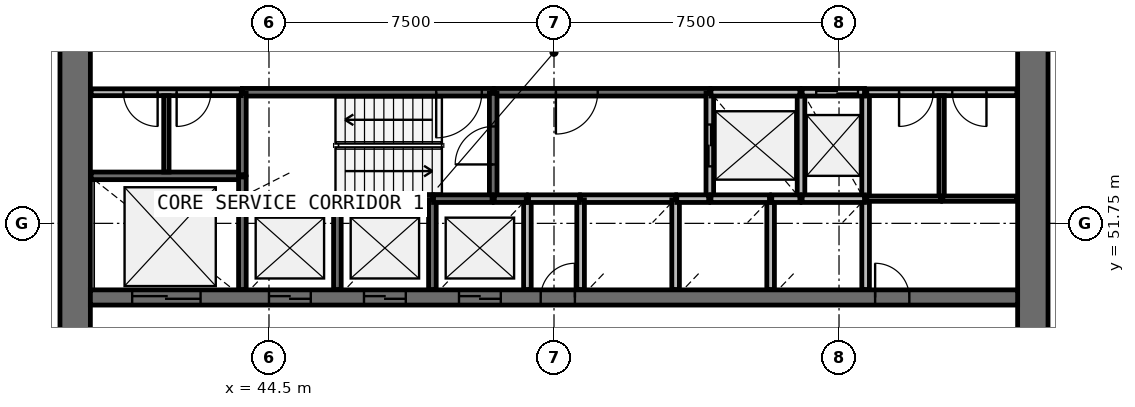
"""IFC4 building model, lengths in metres.
Left out: names, types, materials, properties, quantities, classifications, styles, units other than length and angle.
Written with IfcOpenShell. Run it as: python <this file> out.ifc"""

import sys

from ifc_helpers import new_model, si_unit, direction, frame, frame_2d, origin, place, context, subcontext, project, spatial, rectangle, extrude, source, transform, mapped, element, fill, save


model = new_model("IFC4")
c1 = context("Model", 3, precision=1e-05, world=origin(), true_north=direction((0.0, 1.0)))
c2 = subcontext(c1, "Body", "Model", "MODEL_VIEW")
j1 = project(units=[si_unit("LENGTHUNIT", "METRE"), si_unit("PLANEANGLEUNIT", "RADIAN")], contexts=[c1])
p1 = place(None, origin())
s1 = spatial("IfcSite", under=j1, at=p1, CompositionType="ELEMENT")
p2 = place(p1, origin())
s2 = spatial("IfcBuilding", under=s1, at=p2, CompositionType="ELEMENT")
p3 = place(p2, frame((0.0, 0.0, 124.9)))
s3 = spatial("IfcBuildingStorey", under=s2, at=p3, CompositionType="ELEMENT", Elevation=124.9)
p4 = place(p3, frame((64.6, 38.0, 0.0), z_axis=(0.0, 0.0, 1.0), x_axis=(0.0, 1.0, 0.0)))
e1 = element("IfcWall", 1, at=p4, inside=s3, PredefinedType="SHEAR", context=c2, shape_type="SweptSolid", body=[
    extrude(rectangle(XDim=20.0, YDim=0.8, at=frame_2d((10.0, 0.0))), origin(), (0.0, 0.0, 1.0), 4.1),
])
p5 = place(p4, frame((9.1, 0.0, 0.0)))
e2 = element("IfcOpeningElement", 2, at=p5, cuts=e1, PredefinedType="OPENING", context=c2, shape_type="SweptSolid", body=[
    extrude(rectangle(XDim=1.8, YDim=2.1, at=frame_2d((0.9, 1.05))), frame((0.0, 0.41, 0.0), z_axis=(0.0, -1.0, 0.0), x_axis=(1.0, 0.0, 0.0)), (0.0, 0.0, 1.0), 0.82),
])
p6 = place(p3, frame((39.4, 58.0, 0.0), z_axis=(0.0, 0.0, 1.0), x_axis=(0.0, -1.0, 0.0)))
e3 = element("IfcWall", 3, at=p6, inside=s3, PredefinedType="SHEAR", context=c2, shape_type="SweptSolid", body=[
    extrude(rectangle(XDim=20.0, YDim=0.8, at=frame_2d((10.0, 0.0))), origin(), (0.0, 0.0, 1.0), 4.1),
])
p7 = place(p6, frame((9.1, 0.0, 0.0)))
e4 = element("IfcOpeningElement", 4, at=p7, cuts=e3, PredefinedType="OPENING", context=c2, shape_type="SweptSolid", body=[
    extrude(rectangle(XDim=1.8, YDim=2.1, at=frame_2d((0.9, 1.05))), frame((0.0, 0.41, 0.0), z_axis=(0.0, -1.0, 0.0), x_axis=(1.0, 0.0, 0.0)), (0.0, 0.0, 1.0), 0.82),
])
p8 = place(p3, frame((39.8, 49.8, 0.0), z_axis=(0.0, 0.0, 1.0), x_axis=(1.0, 0.0, 0.0)))
e5 = element("IfcWall", 5, at=p8, inside=s3, PredefinedType="SHEAR", context=c2, shape_type="SweptSolid", body=[
    extrude(rectangle(XDim=24.4, YDim=0.4, at=frame_2d((12.2, 0.0))), origin(), (0.0, 0.0, 1.0), 4.1),
])
p9 = place(p8, frame((4.7, 0.0, 0.0)))
e6 = element("IfcOpeningElement", 6, at=p9, cuts=e5, PredefinedType="OPENING", context=c2, shape_type="SweptSolid", body=[
    extrude(rectangle(XDim=1.1, YDim=2.1, at=frame_2d((0.55, 1.05))), frame((0.0, 0.21, 0.0), z_axis=(0.0, -1.0, 0.0), x_axis=(1.0, 0.0, 0.0)), (0.0, 0.0, 1.0), 0.42),
])
p10 = place(p8, frame((7.2, 0.0, 0.0)))
e7 = element("IfcOpeningElement", 7, at=p10, cuts=e5, PredefinedType="OPENING", context=c2, shape_type="SweptSolid", body=[
    extrude(rectangle(XDim=1.1, YDim=2.1, at=frame_2d((0.55, 1.05))), frame((0.0, 0.21, 0.0), z_axis=(0.0, -1.0, 0.0), x_axis=(1.0, 0.0, 0.0)), (0.0, 0.0, 1.0), 0.42),
])
p11 = place(p8, frame((9.7, 0.0, 0.0)))
e8 = element("IfcOpeningElement", 8, at=p11, cuts=e5, PredefinedType="OPENING", context=c2, shape_type="SweptSolid", body=[
    extrude(rectangle(XDim=1.1, YDim=2.1, at=frame_2d((0.55, 1.05))), frame((0.0, 0.21, 0.0), z_axis=(0.0, -1.0, 0.0), x_axis=(1.0, 0.0, 0.0)), (0.0, 0.0, 1.0), 0.42),
])
p12 = place(p8, frame((1.1, 0.0, 0.0)))
e9 = element("IfcOpeningElement", 9, at=p12, cuts=e5, PredefinedType="OPENING", context=c2, shape_type="SweptSolid", body=[
    extrude(rectangle(XDim=1.8, YDim=2.4, at=frame_2d((0.9, 1.2))), frame((0.0, 0.21, 0.0), z_axis=(0.0, -1.0, 0.0), x_axis=(1.0, 0.0, 0.0)), (0.0, 0.0, 1.0), 0.42),
])
p13 = place(p8, frame((20.65, 0.0, 0.0)))
e10 = element("IfcOpeningElement", 10, at=p13, cuts=e5, PredefinedType="OPENING", context=c2, shape_type="SweptSolid", body=[
    extrude(rectangle(XDim=0.9, YDim=2.1, at=frame_2d((0.45, 1.05))), frame((0.0, 0.21, 0.0), z_axis=(0.0, -1.0, 0.0), x_axis=(1.0, 0.0, 0.0)), (0.0, 0.0, 1.0), 0.42),
])
p14 = place(p8, frame((11.85, 0.0, 0.0)))
e11 = element("IfcOpeningElement", 11, at=p14, cuts=e5, PredefinedType="OPENING", context=c2, shape_type="SweptSolid", body=[
    extrude(rectangle(XDim=0.9, YDim=2.1, at=frame_2d((0.45, 1.05))), frame((0.0, 0.21, 0.0), z_axis=(0.0, -1.0, 0.0), x_axis=(1.0, 0.0, 0.0)), (0.0, 0.0, 1.0), 0.42),
])
p15 = place(p3, frame((50.4, 55.2, 0.0), z_axis=(0.0, 0.0, 1.0), x_axis=(-1.0, 0.0, 0.0)))
e12 = element("IfcWall", 12, at=p15, inside=s3, PredefinedType="SOLIDWALL", context=c2, shape_type="SweptSolid", body=[
    extrude(rectangle(XDim=6.6, YDim=0.2, at=frame_2d((3.3, 0.0))), origin(), (0.0, 0.0, 1.0), 3.6),
])
p16 = place(p15, frame((0.3, 0.0, 0.0)))
e13 = element("IfcOpeningElement", 13, at=p16, cuts=e12, PredefinedType="OPENING", context=c2, shape_type="SweptSolid", body=[
    extrude(rectangle(XDim=1.2, YDim=2.1, at=frame_2d((0.6, 1.05))), frame((0.0, 0.11, 0.0), z_axis=(0.0, -1.0, 0.0), x_axis=(1.0, 0.0, 0.0)), (0.0, 0.0, 1.0), 0.22),
])
p17 = place(p3, frame((56.1, 55.2, 0.0), z_axis=(0.0, 0.0, 1.0), x_axis=(-1.0, 0.0, 0.0)))
e14 = element("IfcWall", 14, at=p17, inside=s3, PredefinedType="SOLIDWALL", context=c2, shape_type="SweptSolid", body=[
    extrude(rectangle(XDim=5.67, YDim=0.2, at=frame_2d((2.835, 0.0))), origin(), (0.0, 0.0, 1.0), 3.6),
])
p18 = place(p17, frame((2.95, 0.0, 0.0)))
e15 = element("IfcOpeningElement", 15, at=p18, cuts=e14, PredefinedType="OPENING", context=c2, shape_type="SweptSolid", body=[
    extrude(rectangle(XDim=1.1, YDim=2.1, at=frame_2d((0.55, 1.05))), frame((0.0, 0.11, 0.0), z_axis=(0.0, -1.0, 0.0), x_axis=(1.0, 0.0, 0.0)), (0.0, 0.0, 1.0), 0.22),
])
p19 = place(p3, frame((43.8, 53.0, 0.0), z_axis=(0.0, 0.0, 1.0), x_axis=(-1.0, 0.0, 0.0)))
e16 = element("IfcWall", 16, at=p19, inside=s3, PredefinedType="SOLIDWALL", context=c2, shape_type="SweptSolid", body=[
    extrude(rectangle(XDim=3.98, YDim=0.2, at=frame_2d((1.99, 0.0))), origin(), (0.0, 0.0, 1.0), 3.6),
])
p20 = place(p3, frame((50.4, 52.4, 0.0), z_axis=(0.0, 0.0, 1.0), x_axis=(0.0, 1.0, 0.0)))
e17 = element("IfcWall", 17, at=p20, inside=s3, PredefinedType="SOLIDWALL", context=c2, shape_type="SweptSolid", body=[
    extrude(rectangle(XDim=2.77, YDim=0.2, at=frame_2d((1.385, 0.0))), origin(), (0.0, 0.0, 1.0), 3.6),
])
p21 = place(p20, frame((0.9, 0.0, 0.0)))
e18 = element("IfcOpeningElement", 18, at=p21, cuts=e17, PredefinedType="OPENING", context=c2, shape_type="SweptSolid", body=[
    extrude(rectangle(XDim=1.0, YDim=2.1, at=frame_2d((0.5, 1.05))), frame((0.0, 0.11, 0.0), z_axis=(0.0, -1.0, 0.0), x_axis=(1.0, 0.0, 0.0)), (0.0, 0.0, 1.0), 0.22),
])
p22 = place(p3, frame((56.1, 55.17, 0.0), z_axis=(0.0, 0.0, 1.0), x_axis=(0.0, -1.0, 0.0)))
e19 = element("IfcWall", 19, at=p22, inside=s3, PredefinedType="SOLIDWALL", context=c2, shape_type="SweptSolid", body=[
    extrude(rectangle(XDim=2.77, YDim=0.2, at=frame_2d((1.385, 0.0))), origin(), (0.0, 0.0, 1.0), 3.6),
])
p23 = place(p22, frame((0.82, 0.0, 0.0)))
e20 = element("IfcOpeningElement", 20, at=p23, cuts=e19, PredefinedType="OPENING", context=c2, shape_type="SweptSolid", body=[
    extrude(rectangle(XDim=1.1, YDim=2.1, at=frame_2d((0.55, 1.05))), frame((0.0, 0.11, 0.0), z_axis=(0.0, -1.0, 0.0), x_axis=(1.0, 0.0, 0.0)), (0.0, 0.0, 1.0), 0.22),
])
for number, where, z_axis, x_axis in (
    (21, (58.5, 52.4, 0.0), (0.0, 0.0, 1.0), (0.0, 1.0, 0.0)),
    (22, (60.2, 52.4, 0.0), (0.0, 0.0, 1.0), (0.0, 1.0, 0.0)),
):
    element("IfcWall", number, at=place(p3, frame(where, z_axis=z_axis, x_axis=x_axis)), inside=s3, PredefinedType="SOLIDWALL", context=c2, shape_type="SweptSolid", body=[
        extrude(rectangle(XDim=2.8, YDim=0.2, at=frame_2d((1.4, 0.0))), origin(), (0.0, 0.0, 1.0), 3.6),
    ])
p24 = place(p3, frame((46.3, 52.4, 0.0), z_axis=(0.0, 0.0, 1.0), x_axis=(-1.0, 0.0, 0.0)))
e23 = element("IfcWall", 23, at=p24, inside=s3, PredefinedType="SOLIDWALL", context=c2, shape_type="SweptSolid", body=[
    extrude(rectangle(XDim=2.5, YDim=0.2, at=frame_2d((1.25, 0.0))), origin(), (0.0, 0.0, 1.0), 3.6),
])
p25 = place(p3, frame((48.8, 52.4, 0.0), z_axis=(0.0, 0.0, 1.0), x_axis=(-1.0, 0.0, 0.0)))
e24 = element("IfcWall", 24, at=p25, inside=s3, PredefinedType="SOLIDWALL", context=c2, shape_type="SweptSolid", body=[
    extrude(rectangle(XDim=2.47, YDim=0.2, at=frame_2d((1.235, 0.0))), origin(), (0.0, 0.0, 1.0), 3.6),
])
p26 = place(p3, frame((55.2, 52.4, 0.0), z_axis=(0.0, 0.0, 1.0), x_axis=(-1.0, 0.0, 0.0)))
e25 = element("IfcWall", 25, at=p26, inside=s3, PredefinedType="SOLIDWALL", context=c2, shape_type="SweptSolid", body=[
    extrude(rectangle(XDim=2.5, YDim=0.2, at=frame_2d((1.25, 0.0))), origin(), (0.0, 0.0, 1.0), 3.6),
])
p27 = place(p3, frame((58.47, 55.2, 0.0), z_axis=(0.0, 0.0, 1.0), x_axis=(-1.0, 0.0, 0.0)))
e26 = element("IfcWall", 26, at=p27, inside=s3, PredefinedType="SOLIDWALL", context=c2, shape_type="SweptSolid", body=[
    extrude(rectangle(XDim=2.34, YDim=0.2, at=frame_2d((1.17, 0.0))), origin(), (0.0, 0.0, 1.0), 3.6),
])
for number, where, z_axis, x_axis in (
    (27, (43.8, 52.37, 0.0), (0.0, 0.0, 1.0), (0.0, -1.0, 0.0)),
    (28, (46.3, 50.01, 0.0), (0.0, 0.0, 1.0), (0.0, 1.0, 0.0)),
    (29, (48.8, 50.01, 0.0), (0.0, 0.0, 1.0), (0.0, 1.0, 0.0)),
):
    element("IfcWall", number, at=place(p3, frame(where, z_axis=z_axis, x_axis=x_axis)), inside=s3, PredefinedType="SOLIDWALL", context=c2, shape_type="SweptSolid", body=[
        extrude(rectangle(XDim=2.36, YDim=0.2, at=frame_2d((1.18, 0.0))), origin(), (0.0, 0.0, 1.0), 3.6),
    ])
p28 = place(p3, frame((51.3, 50.01, 0.0), z_axis=(0.0, 0.0, 1.0), x_axis=(0.0, 1.0, 0.0)))
e30 = element("IfcWall", 30, at=p28, inside=s3, PredefinedType="SOLIDWALL", context=c2, shape_type="SweptSolid", body=[
    extrude(rectangle(XDim=2.39, YDim=0.2, at=frame_2d((1.195, 0.0))), origin(), (0.0, 0.0, 1.0), 3.6),
])
for number, where, z_axis, x_axis in (
    (31, (52.7, 52.37, 0.0), (0.0, 0.0, 1.0), (0.0, -1.0, 0.0)),
    (32, (55.2, 50.01, 0.0), (0.0, 0.0, 1.0), (0.0, 1.0, 0.0)),
):
    element("IfcWall", number, at=place(p3, frame(where, z_axis=z_axis, x_axis=x_axis)), inside=s3, PredefinedType="SOLIDWALL", context=c2, shape_type="SweptSolid", body=[
        extrude(rectangle(XDim=2.36, YDim=0.2, at=frame_2d((1.18, 0.0))), origin(), (0.0, 0.0, 1.0), 3.6),
    ])
p29 = place(p3, frame((57.7, 50.01, 0.0), z_axis=(0.0, 0.0, 1.0), x_axis=(0.0, 1.0, 0.0)))
e33 = element("IfcWall", 33, at=p29, inside=s3, PredefinedType="SOLIDWALL", context=c2, shape_type="SweptSolid", body=[
    extrude(rectangle(XDim=2.39, YDim=0.2, at=frame_2d((1.195, 0.0))), origin(), (0.0, 0.0, 1.0), 3.6),
])
p30 = place(p3, frame((60.2, 50.01, 0.0), z_axis=(0.0, 0.0, 1.0), x_axis=(0.0, 1.0, 0.0)))
e34 = element("IfcWall", 34, at=p30, inside=s3, PredefinedType="SOLIDWALL", context=c2, shape_type="SweptSolid", body=[
    extrude(rectangle(XDim=2.36, YDim=0.2, at=frame_2d((1.18, 0.0))), origin(), (0.0, 0.0, 1.0), 3.6),
])
p31 = place(p3, frame((43.8, 55.17, 0.0), z_axis=(0.0, 0.0, 1.0), x_axis=(0.0, -1.0, 0.0)))
e35 = element("IfcWall", 35, at=p31, inside=s3, PredefinedType="SOLIDWALL", context=c2, shape_type="SweptSolid", body=[
    extrude(rectangle(XDim=2.14, YDim=0.2, at=frame_2d((1.07, 0.0))), origin(), (0.0, 0.0, 1.0), 3.6),
])
p32 = place(p3, frame((60.17, 52.4, 0.0), z_axis=(0.0, 0.0, 1.0), x_axis=(-1.0, 0.0, 0.0)))
e36 = element("IfcWall", 36, at=p32, inside=s3, PredefinedType="SOLIDWALL", context=c2, shape_type="SweptSolid", body=[
    extrude(rectangle(XDim=1.64, YDim=0.2, at=frame_2d((0.82, 0.0))), origin(), (0.0, 0.0, 1.0), 3.6),
])
p33 = place(p3, frame((60.17, 55.2, 0.0), z_axis=(0.0, 0.0, 1.0), x_axis=(-1.0, 0.0, 0.0)))
e37 = element("IfcWall", 37, at=p33, inside=s3, PredefinedType="SOLIDWALL", context=c2, shape_type="SweptSolid", body=[
    extrude(rectangle(XDim=1.64, YDim=0.2, at=frame_2d((0.82, 0.0))), origin(), (0.0, 0.0, 1.0), 3.6),
])
p34 = place(p33, frame((0.17, 0.0, 0.0)))
e38 = element("IfcOpeningElement", 38, at=p34, cuts=e37, PredefinedType="OPENING", context=c2, shape_type="SweptSolid", body=[
    extrude(rectangle(XDim=1.1, YDim=2.1, at=frame_2d((0.55, 1.05))), frame((0.0, 0.11, 0.0), z_axis=(0.0, -1.0, 0.0), x_axis=(1.0, 0.0, 0.0)), (0.0, 0.0, 1.0), 0.22),
])
for number, where, z_axis, x_axis in (
    (39, (50.37, 52.4, 0.0), (0.0, 0.0, 1.0), (-1.0, 0.0, 0.0)),
    (40, (57.67, 52.4, 0.0), (0.0, 0.0, 1.0), (-1.0, 0.0, 0.0)),
):
    element("IfcWall", number, at=place(p3, frame(where, z_axis=z_axis, x_axis=x_axis)), inside=s3, PredefinedType="SOLIDWALL", context=c2, shape_type="SweptSolid", body=[
        extrude(rectangle(XDim=1.54, YDim=0.2, at=frame_2d((0.77, 0.0))), origin(), (0.0, 0.0, 1.0), 3.6),
    ])
p35 = place(p3, frame((51.33, 52.4, 0.0), z_axis=(0.0, 0.0, 1.0), x_axis=(1.0, 0.0, 0.0)))
e41 = element("IfcWall", 41, at=p35, inside=s3, PredefinedType="SOLIDWALL", context=c2, shape_type="SweptSolid", body=[
    extrude(rectangle(XDim=1.34, YDim=0.2, at=frame_2d((0.67, 0.0))), origin(), (0.0, 0.0, 1.0), 3.6),
])
for number, where, z_axis, x_axis in (
    (42, (51.27, 52.4, 0.0), (0.0, 0.0, 1.0), (-1.0, 0.0, 0.0)),
    (43, (56.07, 52.4, 0.0), (0.0, 0.0, 1.0), (-1.0, 0.0, 0.0)),
):
    element("IfcWall", number, at=place(p3, frame(where, z_axis=z_axis, x_axis=x_axis)), inside=s3, PredefinedType="SOLIDWALL", context=c2, shape_type="SweptSolid", body=[
        extrude(rectangle(XDim=0.84, YDim=0.2, at=frame_2d((0.42, 0.0))), origin(), (0.0, 0.0, 1.0), 3.6),
    ])
p36 = place(p3, frame((58.47, 52.4, 0.0), z_axis=(0.0, 0.0, 1.0), x_axis=(-1.0, 0.0, 0.0)))
e44 = element("IfcWall", 44, at=p36, inside=s3, PredefinedType="SOLIDWALL", context=c2, shape_type="SweptSolid", body=[
    extrude(rectangle(XDim=0.74, YDim=0.2, at=frame_2d((0.37, 0.0))), origin(), (0.0, 0.0, 1.0), 3.6),
])
p37 = place(p3, frame((43.8, 52.43, 0.0), z_axis=(0.0, 0.0, 1.0), x_axis=(0.0, 1.0, 0.0)))
e45 = element("IfcWall", 45, at=p37, inside=s3, PredefinedType="SOLIDWALL", context=c2, shape_type="SweptSolid", body=[
    extrude(rectangle(XDim=0.54, YDim=0.2, at=frame_2d((0.27, 0.0))), origin(), (0.0, 0.0, 1.0), 3.6),
])
p38 = place(p3, frame((64.18, 55.2, 0.0), z_axis=(0.0, 0.0, 1.0), x_axis=(-1.0, 0.0, 0.0)))
e46 = element("IfcWall", 46, at=p38, inside=s3, PredefinedType="PARTITIONING", context=c2, shape_type="SweptSolid", body=[
    extrude(rectangle(XDim=3.95, YDim=0.18, at=frame_2d((1.975, 0.0))), origin(), (0.0, 0.0, 1.0), 3.6),
])
p39 = place(p38, frame((2.2, 0.0, 0.0)))
e47 = element("IfcOpeningElement", 47, at=p39, cuts=e46, PredefinedType="OPENING", context=c2, shape_type="SweptSolid", body=[
    extrude(rectangle(XDim=0.9, YDim=2.1, at=frame_2d((0.45, 1.05))), frame((0.0, 0.1, 0.0), z_axis=(0.0, -1.0, 0.0), x_axis=(1.0, 0.0, 0.0)), (0.0, 0.0, 1.0), 0.2),
])
p40 = place(p38, frame((0.8, 0.0, 0.0)))
e48 = element("IfcOpeningElement", 48, at=p40, cuts=e46, PredefinedType="OPENING", context=c2, shape_type="SweptSolid", body=[
    extrude(rectangle(XDim=0.9, YDim=2.1, at=frame_2d((0.45, 1.05))), frame((0.0, 0.1, 0.0), z_axis=(0.0, -1.0, 0.0), x_axis=(1.0, 0.0, 0.0)), (0.0, 0.0, 1.0), 0.2),
])
p41 = place(p3, frame((43.77, 55.2, 0.0), z_axis=(0.0, 0.0, 1.0), x_axis=(-1.0, 0.0, 0.0)))
e49 = element("IfcWall", 49, at=p41, inside=s3, PredefinedType="PARTITIONING", context=c2, shape_type="SweptSolid", body=[
    extrude(rectangle(XDim=3.95, YDim=0.18, at=frame_2d((1.975, 0.0))), origin(), (0.0, 0.0, 1.0), 3.6),
])
p42 = place(p41, frame((2.2, 0.0, 0.0)))
e50 = element("IfcOpeningElement", 50, at=p42, cuts=e49, PredefinedType="OPENING", context=c2, shape_type="SweptSolid", body=[
    extrude(rectangle(XDim=0.9, YDim=2.1, at=frame_2d((0.45, 1.05))), frame((0.0, 0.1, 0.0), z_axis=(0.0, -1.0, 0.0), x_axis=(1.0, 0.0, 0.0)), (0.0, 0.0, 1.0), 0.2),
])
p43 = place(p41, frame((0.8, 0.0, 0.0)))
e51 = element("IfcOpeningElement", 51, at=p43, cuts=e49, PredefinedType="OPENING", context=c2, shape_type="SweptSolid", body=[
    extrude(rectangle(XDim=0.9, YDim=2.1, at=frame_2d((0.45, 1.05))), frame((0.0, 0.1, 0.0), z_axis=(0.0, -1.0, 0.0), x_axis=(1.0, 0.0, 0.0)), (0.0, 0.0, 1.0), 0.2),
])
p44 = place(p3, frame((62.2, 52.4, 0.0), z_axis=(0.0, 0.0, 1.0), x_axis=(0.0, 1.0, 0.0)))
e52 = element("IfcWall", 52, at=p44, inside=s3, PredefinedType="PARTITIONING", context=c2, shape_type="SweptSolid", body=[
    extrude(rectangle(XDim=2.71, YDim=0.14, at=frame_2d((1.355, 0.0))), origin(), (0.0, 0.0, 1.0), 2.8),
])
p45 = place(p3, frame((41.8, 53.1, 0.0), z_axis=(0.0, 0.0, 1.0), x_axis=(0.0, 1.0, 0.0)))
e53 = element("IfcWall", 53, at=p45, inside=s3, PredefinedType="PARTITIONING", context=c2, shape_type="SweptSolid", body=[
    extrude(rectangle(XDim=2.01, YDim=0.14, at=frame_2d((1.005, 0.0))), origin(), (0.0, 0.0, 1.0), 2.8),
])
p46 = place(p3, frame((62.17, 52.4, 0.0), z_axis=(0.0, 0.0, 1.0), x_axis=(-1.0, 0.0, 0.0)))
e54 = element("IfcWall", 54, at=p46, inside=s3, PredefinedType="PARTITIONING", context=c2, shape_type="SweptSolid", body=[
    extrude(rectangle(XDim=1.94, YDim=0.14, at=frame_2d((0.97, 0.0))), origin(), (0.0, 0.0, 1.0), 2.8),
])
p47 = place(p3, frame((64.18, 52.4, 0.0), z_axis=(0.0, 0.0, 1.0), x_axis=(-1.0, 0.0, 0.0)))
e55 = element("IfcWall", 55, at=p47, inside=s3, PredefinedType="PARTITIONING", context=c2, shape_type="SweptSolid", body=[
    extrude(rectangle(XDim=1.95, YDim=0.14, at=frame_2d((0.975, 0.0))), origin(), (0.0, 0.0, 1.0), 2.8),
])
m1 = source(origin(), c2, "Body", "SweptSolid", [
    extrude(rectangle(XDim=1.1, YDim=2.1, at=frame_2d((0.55, 1.05))), frame((0.0, 0.025, 0.0), z_axis=(0.0, -1.0, 0.0), x_axis=(1.0, 0.0, 0.0)), (0.0, 0.0, 1.0), 0.05),
])
p48 = place(p9, origin())
e56 = element("IfcDoor", 56, at=p48, inside=s3, OperationType="DOUBLE_DOOR_SLIDING", PredefinedType="USERDEFINED", context=c2, shape_type="MappedRepresentation", body=[
    mapped(m1, transform((0.0, 0.0, 0.0), scale=1.0)),
])
fill(e6, e56)
p49 = place(p10, origin())
e57 = element("IfcDoor", 57, at=p49, inside=s3, OperationType="DOUBLE_DOOR_SLIDING", PredefinedType="USERDEFINED", context=c2, shape_type="MappedRepresentation", body=[
    mapped(m1, transform((0.0, 0.0, 0.0), scale=1.0)),
])
fill(e7, e57)
p50 = place(p11, origin())
e58 = element("IfcDoor", 58, at=p50, inside=s3, OperationType="DOUBLE_DOOR_SLIDING", PredefinedType="USERDEFINED", context=c2, shape_type="MappedRepresentation", body=[
    mapped(m1, transform((0.0, 0.0, 0.0), scale=1.0)),
])
fill(e8, e58)
p51 = place(p23, origin())
e59 = element("IfcDoor", 59, at=p51, inside=s3, OperationType="DOUBLE_DOOR_SLIDING", PredefinedType="USERDEFINED", context=c2, shape_type="MappedRepresentation", body=[
    mapped(m1, transform((0.0, 0.0, 0.0), scale=1.0)),
])
fill(e20, e59)
p52 = place(p34, origin())
e60 = element("IfcDoor", 60, at=p52, inside=s3, OperationType="DOUBLE_DOOR_SLIDING", PredefinedType="USERDEFINED", context=c2, shape_type="MappedRepresentation", body=[
    mapped(m1, transform((0.0, 0.0, 0.0), scale=1.0)),
])
fill(e38, e60)
m2 = source(origin(), c2, "Body", "SweptSolid", [
    extrude(rectangle(XDim=1.8, YDim=2.4, at=frame_2d((0.9, 1.2))), frame((0.0, 0.025, 0.0), z_axis=(0.0, -1.0, 0.0), x_axis=(1.0, 0.0, 0.0)), (0.0, 0.0, 1.0), 0.05),
])
p53 = place(p12, origin())
e61 = element("IfcDoor", 61, at=p53, inside=s3, OperationType="DOUBLE_DOOR_SLIDING", PredefinedType="USERDEFINED", context=c2, shape_type="MappedRepresentation", body=[
    mapped(m2, transform((0.0, 0.0, 0.0), scale=1.0)),
])
fill(e9, e61)
m3 = source(origin(), c2, "Body", "SweptSolid", [
    extrude(rectangle(XDim=1.2, YDim=2.1, at=frame_2d((0.6, 1.05))), frame((0.0, 0.025, 0.0), z_axis=(0.0, -1.0, 0.0), x_axis=(1.0, 0.0, 0.0)), (0.0, 0.0, 1.0), 0.05),
])
p54 = place(p16, origin())
e62 = element("IfcDoor", 62, at=p54, inside=s3, OperationType="SINGLE_SWING_RIGHT", PredefinedType="DOOR", context=c2, shape_type="MappedRepresentation", body=[
    mapped(m3, transform((0.0, 0.0, 0.0), scale=1.0)),
])
fill(e13, e62)
m4 = source(origin(), c2, "Body", "SweptSolid", [
    extrude(rectangle(XDim=1.0, YDim=2.1, at=frame_2d((0.5, 1.05))), frame((0.0, 0.025, 0.0), z_axis=(0.0, -1.0, 0.0), x_axis=(1.0, 0.0, 0.0)), (0.0, 0.0, 1.0), 0.05),
])
p55 = place(p21, origin())
e63 = element("IfcDoor", 63, at=p55, inside=s3, OperationType="SINGLE_SWING_LEFT", PredefinedType="DOOR", context=c2, shape_type="MappedRepresentation", body=[
    mapped(m4, transform((0.0, 0.0, 0.0), scale=1.0)),
])
fill(e18, e63)
m5 = source(origin(), c2, "Body", "SweptSolid", [
    extrude(rectangle(XDim=1.1, YDim=2.1, at=frame_2d((0.55, 1.05))), frame((0.0, 0.025, 0.0), z_axis=(0.0, -1.0, 0.0), x_axis=(1.0, 0.0, 0.0)), (0.0, 0.0, 1.0), 0.05),
])
p56 = place(p18, origin())
e64 = element("IfcDoor", 64, at=p56, inside=s3, OperationType="SINGLE_SWING_RIGHT", PredefinedType="DOOR", context=c2, shape_type="MappedRepresentation", body=[
    mapped(m5, transform((0.0, 0.0, 0.0), scale=1.0)),
])
fill(e15, e64)
m6 = source(origin(), c2, "Body", "SweptSolid", [
    extrude(rectangle(XDim=0.9, YDim=2.1, at=frame_2d((0.45, 1.05))), frame((0.0, 0.025, 0.0), z_axis=(0.0, -1.0, 0.0), x_axis=(1.0, 0.0, 0.0)), (0.0, 0.0, 1.0), 0.05),
])
p57 = place(p42, origin())
e65 = element("IfcDoor", 65, at=p57, inside=s3, OperationType="SINGLE_SWING_LEFT", PredefinedType="DOOR", context=c2, shape_type="MappedRepresentation", body=[
    mapped(m6, transform((0.0, 0.0, 0.0), scale=1.0)),
])
fill(e50, e65)
p58 = place(p43, origin())
e66 = element("IfcDoor", 66, at=p58, inside=s3, OperationType="SINGLE_SWING_RIGHT", PredefinedType="DOOR", context=c2, shape_type="MappedRepresentation", body=[
    mapped(m6, transform((0.0, 0.0, 0.0), scale=1.0)),
])
fill(e51, e66)
p59 = place(p13, origin())
e67 = element("IfcDoor", 67, at=p59, inside=s3, OperationType="SINGLE_SWING_LEFT", PredefinedType="DOOR", context=c2, shape_type="MappedRepresentation", body=[
    mapped(m6, transform((0.0, 0.0, 0.0), scale=1.0)),
])
fill(e10, e67)
p60 = place(p39, origin())
e68 = element("IfcDoor", 68, at=p60, inside=s3, OperationType="SINGLE_SWING_RIGHT", PredefinedType="DOOR", context=c2, shape_type="MappedRepresentation", body=[
    mapped(m6, transform((0.0, 0.0, 0.0), scale=1.0)),
])
fill(e47, e68)
p61 = place(p40, origin())
e69 = element("IfcDoor", 69, at=p61, inside=s3, OperationType="SINGLE_SWING_LEFT", PredefinedType="DOOR", context=c2, shape_type="MappedRepresentation", body=[
    mapped(m6, transform((0.0, 0.0, 0.0), scale=1.0)),
])
fill(e48, e69)
p62 = place(p14, origin())
e70 = element("IfcDoor", 70, at=p62, inside=s3, OperationType="SINGLE_SWING_RIGHT", PredefinedType="DOOR", context=c2, shape_type="MappedRepresentation", body=[
    mapped(m6, transform((0.0, 0.0, 0.0), scale=1.0)),
])
fill(e11, e70)
save(model, sys.argv[1])
